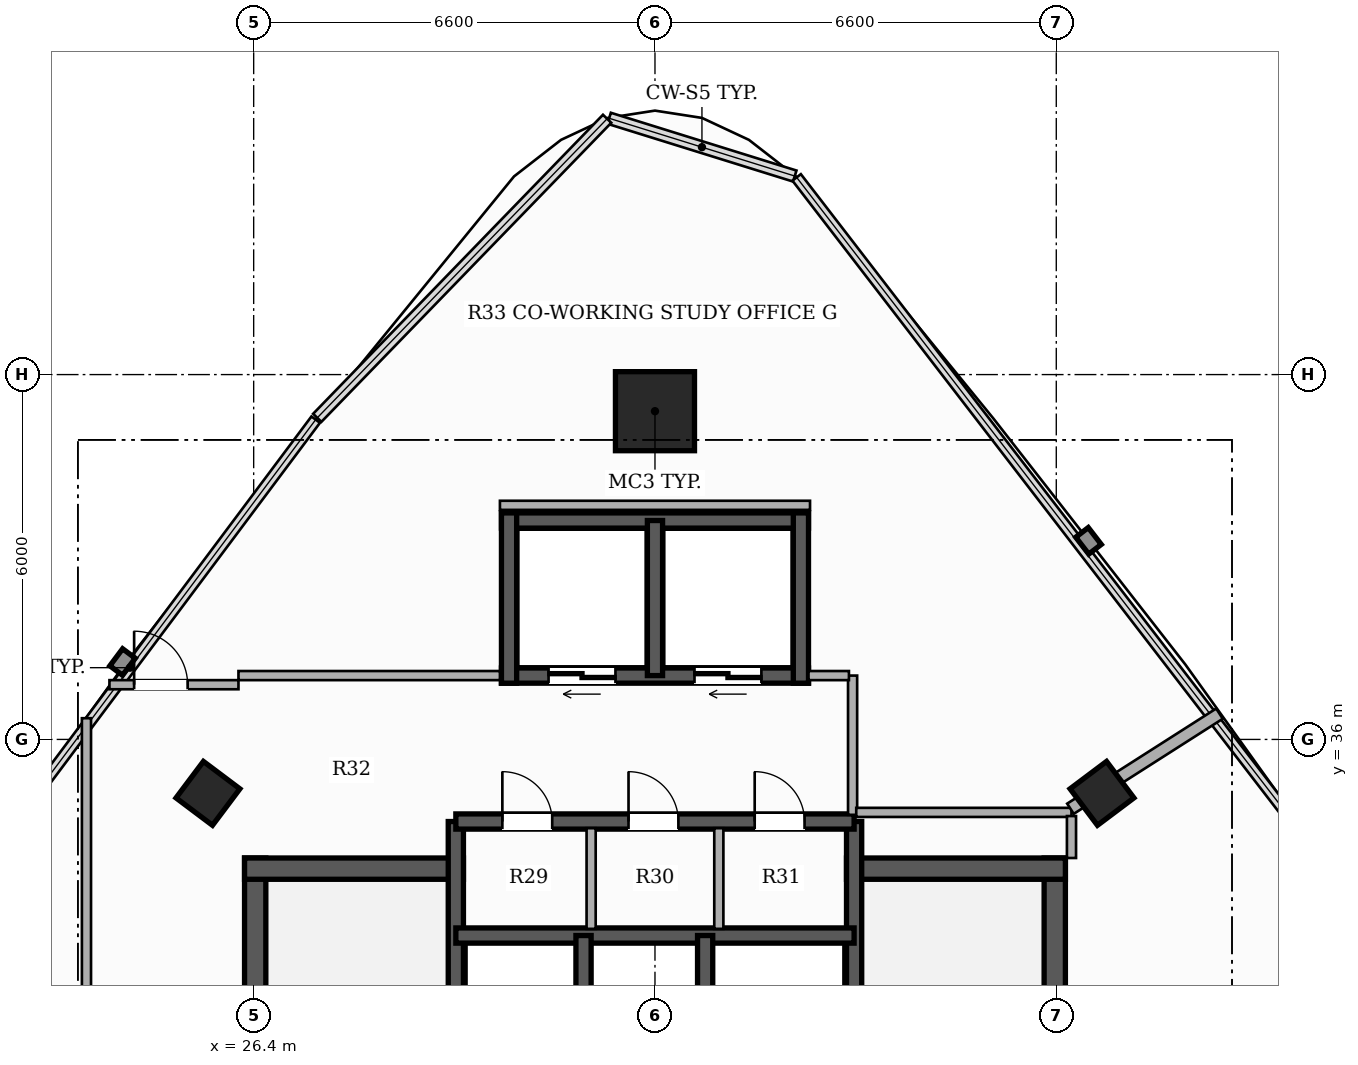
"""IFC4 building model, lengths in metres.
Left out: names, types, materials, properties, quantities, classifications, styles, units other than length and angle.
Written with IfcOpenShell. Run it as: python <this file> out.ifc"""

import sys

from ifc_helpers import new_model, si_unit, direction, frame, frame_2d, origin, origin_2d, place, context, subcontext, project, spatial, rectangle, hollow_rectangle, extrude, element, fill, save


model = new_model("IFC4")
c1 = context("Model", 3, precision=1e-05, world=origin(), true_north=direction((0.0, 1.0)))
c2 = subcontext(c1, "Body", "Model", "MODEL_VIEW")
j1 = project(units=[si_unit("LENGTHUNIT", "METRE"), si_unit("PLANEANGLEUNIT", "RADIAN")], contexts=[c1])
p1 = place(None, origin())
s1 = spatial("IfcSite", under=j1, at=p1, CompositionType="ELEMENT")
p2 = place(p1, origin())
s2 = spatial("IfcBuilding", under=s1, at=p2, CompositionType="ELEMENT")
p3 = place(p2, frame((0.0, 0.0, 212.9)))
s3 = spatial("IfcBuildingStorey", under=s2, at=p3, CompositionType="ELEMENT", Elevation=212.9)
p4 = place(p3, frame((26.425, 26.55, 0.0), z_axis=(0.0, 0.0, 1.0), x_axis=(0.0, 1.0, 0.0)))
e1 = element("IfcWall", 1, at=p4, inside=s3, PredefinedType="SHEAR", context=c2, shape_type="SweptSolid", body=[
    extrude(rectangle(XDim=7.5, YDim=0.35, at=frame_2d((3.75, 0.0))), origin(), (0.0, 0.0, 1.0), 3.3),
])
p5 = place(p3, frame((26.25, 33.875, 0.0), z_axis=(0.0, 0.0, 1.0), x_axis=(1.0, 0.0, 0.0)))
e2 = element("IfcWall", 2, at=p5, inside=s3, PredefinedType="SHEAR", context=c2, shape_type="SweptSolid", body=[
    extrude(rectangle(XDim=3.6, YDim=0.35, at=frame_2d((1.8, 0.0))), origin(), (0.0, 0.0, 1.0), 3.3),
])
p6 = place(p3, frame((39.575, 26.55, 0.0), z_axis=(0.0, 0.0, 1.0), x_axis=(0.0, 1.0, 0.0)))
e3 = element("IfcWall", 3, at=p6, inside=s3, PredefinedType="SHEAR", context=c2, shape_type="SweptSolid", body=[
    extrude(rectangle(XDim=7.5, YDim=0.35, at=frame_2d((3.75, 0.0))), origin(), (0.0, 0.0, 1.0), 3.3),
])
p7 = place(p3, frame((36.15, 33.875, 0.0), z_axis=(0.0, 0.0, 1.0), x_axis=(1.0, 0.0, 0.0)))
e4 = element("IfcWall", 4, at=p7, inside=s3, PredefinedType="SHEAR", context=c2, shape_type="SweptSolid", body=[
    extrude(rectangle(XDim=3.6, YDim=0.35, at=frame_2d((1.8, 0.0))), origin(), (0.0, 0.0, 1.0), 3.3),
])
p8 = place(p3, frame((29.725, 26.55, 0.0), z_axis=(0.0, 0.0, 1.0), x_axis=(0.0, 1.0, 0.0)))
e5 = element("IfcWall", 5, at=p8, inside=s3, PredefinedType="SHEAR", context=c2, shape_type="SweptSolid", body=[
    extrude(rectangle(XDim=8.1, YDim=0.25, at=frame_2d((4.05, 0.0))), origin(), (0.0, 0.0, 1.0), 3.3),
])
p9 = place(p8, frame((0.6, 0.0, 0.0)))
e6 = element("IfcOpeningElement", 6, at=p9, cuts=e5, PredefinedType="OPENING", context=c2, shape_type="SweptSolid", body=[
    extrude(rectangle(XDim=1.05, YDim=2.15, at=frame_2d((0.525, 1.075))), frame((0.0, 0.135, 0.0), z_axis=(0.0, -1.0, 0.0), x_axis=(1.0, 0.0, 0.0)), (0.0, 0.0, 1.0), 0.27),
])
p10 = place(p3, frame((36.275, 26.55, 0.0), z_axis=(0.0, 0.0, 1.0), x_axis=(0.0, 1.0, 0.0)))
e7 = element("IfcWall", 7, at=p10, inside=s3, PredefinedType="SHEAR", context=c2, shape_type="SweptSolid", body=[
    extrude(rectangle(XDim=8.1, YDim=0.25, at=frame_2d((4.05, 0.0))), origin(), (0.0, 0.0, 1.0), 3.3),
])
p11 = place(p10, frame((0.6, 0.0, 0.0)))
e8 = element("IfcOpeningElement", 8, at=p11, cuts=e7, PredefinedType="OPENING", context=c2, shape_type="SweptSolid", body=[
    extrude(rectangle(XDim=1.05, YDim=2.15, at=frame_2d((0.525, 1.075))), frame((0.0, 0.135, 0.0), z_axis=(0.0, -1.0, 0.0), x_axis=(1.0, 0.0, 0.0)), (0.0, 0.0, 1.0), 0.27),
])
p12 = place(p3, frame((29.725, 32.775, 0.0), z_axis=(0.0, 0.0, 1.0), x_axis=(1.0, 0.0, 0.0)))
e9 = element("IfcWall", 9, at=p12, inside=s3, PredefinedType="SHEAR", context=c2, shape_type="SweptSolid", body=[
    extrude(rectangle(XDim=6.55, YDim=0.25, at=frame_2d((3.275, 0.0))), origin(), (0.0, 0.0, 1.0), 3.3),
])
for number, where, z_axis, x_axis in (
    (10, (31.825, 29.875, 0.0), (0.0, 0.0, 1.0), (0.0, 1.0, 0.0)),
    (11, (33.825, 29.875, 0.0), (0.0, 0.0, 1.0), (0.0, 1.0, 0.0)),
):
    element("IfcWall", number, at=place(p3, frame(where, z_axis=z_axis, x_axis=x_axis)), inside=s3, PredefinedType="SHEAR", context=c2, shape_type="SweptSolid", body=[
        extrude(rectangle(XDim=2.9, YDim=0.25, at=frame_2d((1.45, 0.0))), origin(), (0.0, 0.0, 1.0), 3.3),
    ])
p13 = place(p3, frame((29.725, 34.65, 0.0), z_axis=(0.0, 0.0, 1.0), x_axis=(1.0, 0.0, 0.0)))
e12 = element("IfcWall", 12, at=p13, inside=s3, PredefinedType="SHEAR", context=c2, shape_type="SweptSolid", body=[
    extrude(rectangle(XDim=6.55, YDim=0.25, at=frame_2d((3.275, 0.0))), origin(), (0.0, 0.0, 1.0), 3.3),
])
p14 = place(p13, frame((0.765, 0.0, 0.0)))
e13 = element("IfcOpeningElement", 13, at=p14, cuts=e12, PredefinedType="OPENING", context=c2, shape_type="SweptSolid", body=[
    extrude(rectangle(XDim=0.82, YDim=2.1, at=frame_2d((0.41, 1.05))), frame((0.0, 0.135, 0.0), z_axis=(0.0, -1.0, 0.0), x_axis=(1.0, 0.0, 0.0)), (0.0, 0.0, 1.0), 0.27),
])
p15 = place(p13, frame((2.84, 0.0, 0.0)))
e14 = element("IfcOpeningElement", 14, at=p15, cuts=e12, PredefinedType="OPENING", context=c2, shape_type="SweptSolid", body=[
    extrude(rectangle(XDim=0.82, YDim=2.1, at=frame_2d((0.41, 1.05))), frame((0.0, 0.135, 0.0), z_axis=(0.0, -1.0, 0.0), x_axis=(1.0, 0.0, 0.0)), (0.0, 0.0, 1.0), 0.27),
])
p16 = place(p13, frame((4.915, 0.0, 0.0)))
e15 = element("IfcOpeningElement", 15, at=p16, cuts=e12, PredefinedType="OPENING", context=c2, shape_type="SweptSolid", body=[
    extrude(rectangle(XDim=0.82, YDim=2.1, at=frame_2d((0.41, 1.05))), frame((0.0, 0.135, 0.0), z_axis=(0.0, -1.0, 0.0), x_axis=(1.0, 0.0, 0.0)), (0.0, 0.0, 1.0), 0.27),
])
p17 = place(p3, frame((35.525, 37.05, 0.0), z_axis=(0.0, 0.0, 1.0), x_axis=(-1.0, 0.0, 0.0)))
e16 = element("IfcWall", 16, at=p17, inside=s3, PredefinedType="SHEAR", context=c2, shape_type="SweptSolid", body=[
    extrude(rectangle(XDim=5.05, YDim=0.25, at=frame_2d((2.525, 0.0))), origin(), (0.0, 0.0, 1.0), 3.3),
])
p18 = place(p17, frame((3.175, 0.0, 0.0)))
e17 = element("IfcOpeningElement", 17, at=p18, cuts=e16, PredefinedType="OPENING", context=c2, shape_type="SweptSolid", body=[
    extrude(rectangle(XDim=1.1, YDim=2.2, at=frame_2d((0.55, 1.1))), frame((0.0, 0.135, 0.0), z_axis=(0.0, -1.0, 0.0), x_axis=(1.0, 0.0, 0.0)), (0.0, 0.0, 1.0), 0.27),
])
p19 = place(p17, frame((0.775, 0.0, 0.0)))
e18 = element("IfcOpeningElement", 18, at=p19, cuts=e16, PredefinedType="OPENING", context=c2, shape_type="SweptSolid", body=[
    extrude(rectangle(XDim=1.1, YDim=2.2, at=frame_2d((0.55, 1.1))), frame((0.0, 0.135, 0.0), z_axis=(0.0, -1.0, 0.0), x_axis=(1.0, 0.0, 0.0)), (0.0, 0.0, 1.0), 0.27),
])
p20 = place(p3, frame((30.475, 39.6, 0.0), z_axis=(0.0, 0.0, 1.0), x_axis=(1.0, 0.0, 0.0)))
e19 = element("IfcWall", 19, at=p20, inside=s3, PredefinedType="SHEAR", context=c2, shape_type="SweptSolid", body=[
    extrude(rectangle(XDim=5.05, YDim=0.25, at=frame_2d((2.525, 0.0))), origin(), (0.0, 0.0, 1.0), 3.3),
])
for number, where, z_axis, x_axis in (
    (20, (30.6, 36.925, 0.0), (0.0, 0.0, 1.0), (0.0, 1.0, 0.0)),
    (21, (35.4, 36.925, 0.0), (0.0, 0.0, 1.0), (0.0, 1.0, 0.0)),
):
    element("IfcWall", number, at=place(p3, frame(where, z_axis=z_axis, x_axis=x_axis)), inside=s3, PredefinedType="SHEAR", context=c2, shape_type="SweptSolid", body=[
        extrude(rectangle(XDim=2.8, YDim=0.25, at=frame_2d((1.4, 0.0))), origin(), (0.0, 0.0, 1.0), 3.3),
    ])
p21 = place(p3, frame((33.0, 37.05, 0.0), z_axis=(0.0, 0.0, 1.0), x_axis=(0.0, 1.0, 0.0)))
e22 = element("IfcWall", 22, at=p21, inside=s3, PredefinedType="SHEAR", context=c2, shape_type="SweptSolid", body=[
    extrude(rectangle(XDim=2.55, YDim=0.25, at=frame_2d((1.275, 0.0))), origin(), (0.0, 0.0, 1.0), 3.3),
])
p22 = place(p3, frame((33.0, 41.398, 0.0), z_axis=(0.0, 0.0, 1.0), x_axis=(1.0, 0.0, 0.0)))
e23 = element("IfcColumn", 23, at=p22, inside=s3, PredefinedType="COLUMN", context=c2, shape_type="SweptSolid", body=[
    extrude(hollow_rectangle(XDim=1.3, YDim=1.3, WallThickness=0.04, at=origin_2d()), origin(), (0.0, 0.0, 1.0), 3.3),
])
for number, where, z_axis, x_axis in (
    (24, (25.648, 35.113, 0.0), (0.0, 0.0, 1.0), (0.6, 0.8, 0.0)),
    (25, (40.352, 35.113, 0.0), (0.0, 0.0, 1.0), (-0.6, 0.8, 0.0)),
):
    element("IfcColumn", number, at=place(p3, frame(where, z_axis=z_axis, x_axis=x_axis)), inside=s3, PredefinedType="COLUMN", context=c2, shape_type="SweptSolid", body=[
        extrude(hollow_rectangle(XDim=0.75, YDim=0.75, WallThickness=0.025, at=origin_2d()), origin(), (0.0, 0.0, 1.0), 3.3),
    ])
p23 = place(p3, frame((36.25, 34.76, 0.0), z_axis=(0.0, 0.0, 1.0), x_axis=(0.0, 1.0, 0.0)))
e26 = element("IfcWall", 26, at=p23, inside=s3, PredefinedType="PARTITIONING", context=c2, shape_type="SweptSolid", body=[
    extrude(rectangle(XDim=2.29, YDim=0.15, at=frame_2d((1.145, 0.0))), origin(), (0.0, 0.0, 1.0), 2.425),
])
p24 = place(p3, frame((35.525, 37.05, 0.0), z_axis=(0.0, 0.0, 1.0), x_axis=(1.0, 0.0, 0.0)))
e27 = element("IfcWall", 27, at=p24, inside=s3, PredefinedType="PARTITIONING", context=c2, shape_type="SweptSolid", body=[
    extrude(rectangle(XDim=0.665, YDim=0.15, at=frame_2d((0.333, 0.0))), origin(), (0.0, 0.0, 1.0), 2.425),
])
for number, where, z_axis, x_axis in (
    (28, (31.95, 32.885, 0.0), (0.0, 0.0, 1.0), (0.0, 1.0, 0.0)),
    (29, (34.05, 32.885, 0.0), (0.0, 0.0, 1.0), (0.0, 1.0, 0.0)),
):
    element("IfcWall", number, at=place(p3, frame(where, z_axis=z_axis, x_axis=x_axis)), inside=s3, PredefinedType="PARTITIONING", context=c2, shape_type="SweptSolid", body=[
        extrude(rectangle(XDim=1.655, YDim=0.15, at=frame_2d((0.828, 0.0))), origin(), (0.0, 0.0, 1.0), 3.06),
    ])
p25 = place(p3, frame((23.65, 23.91, 0.0), z_axis=(0.0, 0.0, 1.0), x_axis=(0.0, 1.0, 0.0)))
e30 = element("IfcWall", 30, at=p25, inside=s3, PredefinedType="PARTITIONING", context=c2, shape_type="SweptSolid", body=[
    extrude(rectangle(XDim=12.439, YDim=0.15, at=frame_2d((6.22, 0.0))), origin(), (0.0, 0.0, 1.0), 2.492),
])
p26 = place(p25, frame((5.759, 0.0, 0.0)))
e31 = element("IfcOpeningElement", 31, at=p26, cuts=e30, PredefinedType="OPENING", context=c2, shape_type="SweptSolid", body=[
    extrude(rectangle(XDim=0.92, YDim=2.15, at=frame_2d((0.46, 1.075))), frame((0.0, 0.085, 0.0), z_axis=(0.0, -1.0, 0.0), x_axis=(1.0, 0.0, 0.0)), (0.0, 0.0, 1.0), 0.17),
])
p27 = place(p3, frame((24.028, 36.9, 0.0), z_axis=(0.0, 0.0, 1.0), x_axis=(1.0, 0.0, 0.0)))
e32 = element("IfcWall", 32, at=p27, inside=s3, PredefinedType="PARTITIONING", context=c2, shape_type="SweptSolid", body=[
    extrude(rectangle(XDim=2.122, YDim=0.15, at=frame_2d((1.061, 0.0))), origin(), (0.0, 0.0, 1.0), 2.619),
])
p28 = place(p27, frame((0.406, 0.0, 0.0)))
e33 = element("IfcOpeningElement", 33, at=p28, cuts=e32, PredefinedType="OPENING", context=c2, shape_type="SweptSolid", body=[
    extrude(rectangle(XDim=0.88, YDim=2.1, at=frame_2d((0.44, 1.05))), frame((0.0, 0.085, 0.0), z_axis=(0.0, -1.0, 0.0), x_axis=(1.0, 0.0, 0.0)), (0.0, 0.0, 1.0), 0.17),
])
p29 = place(p3, frame((26.15, 37.05, 0.0), z_axis=(0.0, 0.0, 1.0), x_axis=(1.0, 0.0, 0.0)))
e34 = element("IfcWall", 34, at=p29, inside=s3, PredefinedType="PARTITIONING", context=c2, shape_type="SweptSolid", body=[
    extrude(rectangle(XDim=4.3, YDim=0.15, at=frame_2d((2.15, 0.0))), origin(), (0.0, 0.0, 1.0), 2.425),
])
p30 = place(p3, frame((30.45, 39.85, 0.0), z_axis=(0.0, 0.0, 1.0), x_axis=(1.0, 0.0, 0.0)))
e35 = element("IfcWall", 35, at=p30, inside=s3, PredefinedType="PARTITIONING", context=c2, shape_type="SweptSolid", body=[
    extrude(rectangle(XDim=5.1, YDim=0.15, at=frame_2d((2.55, 0.0))), origin(), (0.0, 0.0, 1.0), 2.492),
])
p31 = place(p3, frame((36.31, 34.8, 0.0), z_axis=(0.0, 0.0, 1.0), x_axis=(1.0, 0.0, 0.0)))
e36 = element("IfcWall", 36, at=p31, inside=s3, PredefinedType="PARTITIONING", context=c2, shape_type="SweptSolid", body=[
    extrude(rectangle(XDim=3.54, YDim=0.15, at=frame_2d((1.77, 0.0))), origin(), (0.0, 0.0, 1.0), 2.425),
])
p32 = place(p3, frame((39.85, 34.74, 0.0), z_axis=(0.0, 0.0, 1.0), x_axis=(0.0, -1.0, 0.0)))
e37 = element("IfcWall", 37, at=p32, inside=s3, PredefinedType="PARTITIONING", context=c2, shape_type="SweptSolid", body=[
    extrude(rectangle(XDim=0.69, YDim=0.15, at=frame_2d((0.345, 0.0))), origin(), (0.0, 0.0, 1.0), 2.773),
])
p33 = place(p3, frame((39.833, 34.86, 0.0), z_axis=(0.0, 0.0, 1.0), x_axis=(0.842993506682, 0.537923737803, 0.0)))
e38 = element("IfcWall", 38, at=p33, inside=s3, PredefinedType="PARTITIONING", context=c2, shape_type="SweptSolid", body=[
    extrude(rectangle(XDim=2.907, YDim=0.2, at=frame_2d((1.454, 0.0))), origin(), (0.0, 0.0, 1.0), 2.492),
])
p34 = place(p18, origin())
e39 = element("IfcDoor", 39, at=p34, inside=s3, OperationType="DOUBLE_DOOR_SLIDING", PredefinedType="DOOR", context=c2, shape_type="SweptSolid", body=[
    extrude(rectangle(XDim=1.1, YDim=2.2, at=frame_2d((0.55, 1.1))), frame((0.0, 0.025, 0.0), z_axis=(0.0, -1.0, 0.0), x_axis=(1.0, 0.0, 0.0)), (0.0, 0.0, 1.0), 0.05),
])
fill(e17, e39)
p35 = place(p19, origin())
e40 = element("IfcDoor", 40, at=p35, inside=s3, OperationType="DOUBLE_DOOR_SLIDING", PredefinedType="DOOR", context=c2, shape_type="SweptSolid", body=[
    extrude(rectangle(XDim=1.1, YDim=2.2, at=frame_2d((0.55, 1.1))), frame((0.0, 0.025, 0.0), z_axis=(0.0, -1.0, 0.0), x_axis=(1.0, 0.0, 0.0)), (0.0, 0.0, 1.0), 0.05),
])
fill(e18, e40)
p36 = place(p14, origin())
e41 = element("IfcDoor", 41, at=p36, inside=s3, OperationType="SINGLE_SWING_LEFT", PredefinedType="DOOR", context=c2, shape_type="SweptSolid", body=[
    extrude(rectangle(XDim=0.82, YDim=2.1, at=frame_2d((0.41, 1.05))), frame((0.0, 0.025, 0.0), z_axis=(0.0, -1.0, 0.0), x_axis=(1.0, 0.0, 0.0)), (0.0, 0.0, 1.0), 0.05),
])
fill(e13, e41)
p37 = place(p15, origin())
e42 = element("IfcDoor", 42, at=p37, inside=s3, OperationType="SINGLE_SWING_LEFT", PredefinedType="DOOR", context=c2, shape_type="SweptSolid", body=[
    extrude(rectangle(XDim=0.82, YDim=2.1, at=frame_2d((0.41, 1.05))), frame((0.0, 0.025, 0.0), z_axis=(0.0, -1.0, 0.0), x_axis=(1.0, 0.0, 0.0)), (0.0, 0.0, 1.0), 0.05),
])
fill(e14, e42)
p38 = place(p16, origin())
e43 = element("IfcDoor", 43, at=p38, inside=s3, OperationType="SINGLE_SWING_LEFT", PredefinedType="DOOR", context=c2, shape_type="SweptSolid", body=[
    extrude(rectangle(XDim=0.82, YDim=2.1, at=frame_2d((0.41, 1.05))), frame((0.0, 0.025, 0.0), z_axis=(0.0, -1.0, 0.0), x_axis=(1.0, 0.0, 0.0)), (0.0, 0.0, 1.0), 0.05),
])
fill(e15, e43)
p39 = place(p28, origin())
e44 = element("IfcDoor", 44, at=p39, inside=s3, OperationType="SINGLE_SWING_LEFT", PredefinedType="DOOR", context=c2, shape_type="SweptSolid", body=[
    extrude(rectangle(XDim=0.88, YDim=2.1, at=frame_2d((0.44, 1.05))), frame((0.0, 0.025, 0.0), z_axis=(0.0, -1.0, 0.0), x_axis=(1.0, 0.0, 0.0)), (0.0, 0.0, 1.0), 0.05),
])
fill(e33, e44)
save(model, sys.argv[1])
